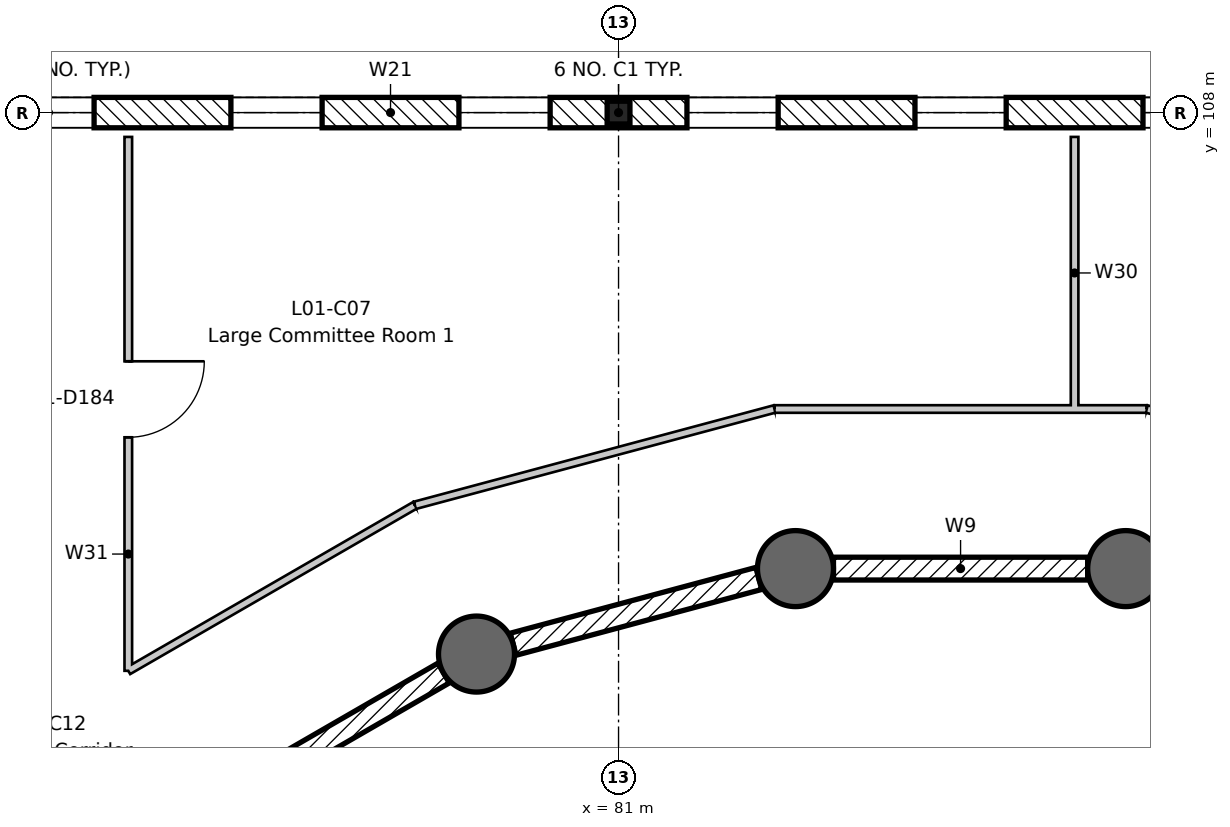
"""IFC4 building model, lengths in metres.
Left out: names, types, materials, properties, quantities, classifications, styles, units other than length and angle.
Written with IfcOpenShell. Run it as: python <this file> out.ifc"""

import sys

from ifc_helpers import new_model, si_unit, direction, frame, frame_2d, origin, origin_2d, place, context, subcontext, project, spatial, rectangle, circle, i_section, extrude, element, fill, save


model = new_model("IFC4")
c1 = context("Model", 3, precision=1e-05, world=origin(), true_north=direction((0.0, 1.0)))
c2 = subcontext(c1, "Body", "Model", "MODEL_VIEW")
j1 = project(units=[si_unit("LENGTHUNIT", "METRE"), si_unit("PLANEANGLEUNIT", "RADIAN")], contexts=[c1])
p1 = place(None, origin())
s1 = spatial("IfcSite", under=j1, at=p1, CompositionType="ELEMENT")
p2 = place(p1, origin())
s2 = spatial("IfcBuilding", under=s1, at=p2, CompositionType="ELEMENT")
p3 = place(p2, frame((0.0, 0.0, 5.4)))
s3 = spatial("IfcBuildingStorey", under=s2, at=p3, CompositionType="ELEMENT", Elevation=5.4)
for number, where, z_axis, x_axis in (
    (1, (87.672, 102.0, -0.2), (0.0, 0.0, 1.0), (1.0, 0.0, 0.0)),
    (2, (83.328, 102.0, -0.2), (0.0, 0.0, 1.0), (1.0, 0.0, 0.0)),
    (3, (79.131, 100.875, -0.2), (0.0, 0.0, 1.0), (1.0, 0.0, 0.0)),
):
    element("IfcColumn", number, at=place(p3, frame(where, z_axis=z_axis, x_axis=x_axis)), inside=s3, PredefinedType="COLUMN", context=c2, shape_type="SweptSolid", body=[
        extrude(circle(Radius=0.5, at=origin_2d()), origin(), (0.0, 0.0, 1.0), 2.7),
    ])
p4 = place(p3, frame((81.0, 108.0, -0.2), z_axis=(0.0, 0.0, 1.0), x_axis=(1.0, 0.0, 0.0)))
e4 = element("IfcColumn", 4, at=p4, inside=s3, PredefinedType="COLUMN", context=c2, shape_type="SweptSolid", body=[
    extrude(i_section(OverallWidth=0.3, OverallDepth=0.3, WebThickness=0.011, FlangeThickness=0.019, FilletRadius=0.027, at=origin_2d()), origin(), (0.0, 0.0, 1.0), 4.5),
])
p5 = place(p3, frame((87.172, 102.0, 0.0), z_axis=(0.0, 0.0, 1.0), x_axis=(-1.0, 0.0, 0.0)))
e5 = element("IfcWall", 5, at=p5, inside=s3, PredefinedType="PARTITIONING", context=c2, shape_type="SweptSolid", body=[
    extrude(rectangle(XDim=3.345, YDim=0.3, at=frame_2d((1.672, 0.0))), origin(), (0.0, 0.0, 1.0), 2.5),
])
for number, where, z_axis, x_axis in (
    (6, (82.845, 101.871, 0.0), (0.0, 0.0, 1.0), (-0.966, -0.259, 0.0)),
    (7, (78.698, 100.625, 0.0), (0.0, 0.0, 1.0), (-0.866, -0.5, 0.0)),
):
    element("IfcWall", number, at=place(p3, frame(where, z_axis=z_axis, x_axis=x_axis)), inside=s3, PredefinedType="PARTITIONING", context=c2, shape_type="SweptSolid", body=[
        extrude(rectangle(XDim=3.344, YDim=0.3, at=frame_2d((1.672, 0.0))), origin(), (0.0, 0.0, 1.0), 2.5),
    ])
p6 = place(p3, frame((72.0, 108.0, 0.0), z_axis=(0.0, 0.0, 1.0), x_axis=(1.0, 0.0, 0.0)))
e8 = element("IfcWall", 8, at=p6, inside=s3, PredefinedType="STANDARD", context=c2, shape_type="SweptSolid", body=[
    extrude(rectangle(XDim=27.0, YDim=0.4, at=frame_2d((13.5, 0.0))), origin(), (0.0, 0.0, 1.0), 3.81),
])
p7 = place(p6, frame((0.9, 0.0, 0.9)))
e9 = element("IfcOpeningElement", 9, at=p7, cuts=e8, PredefinedType="OPENING", context=c2, shape_type="SweptSolid", body=[
    extrude(rectangle(XDim=1.2, YDim=2.4, at=frame_2d((0.6, 1.2))), frame((0.0, 0.21, 0.0), z_axis=(0.0, -1.0, 0.0), x_axis=(1.0, 0.0, 0.0)), (0.0, 0.0, 1.0), 0.42),
])
p8 = place(p6, frame((3.9, 0.0, 0.9)))
e10 = element("IfcOpeningElement", 10, at=p8, cuts=e8, PredefinedType="OPENING", context=c2, shape_type="SweptSolid", body=[
    extrude(rectangle(XDim=1.2, YDim=2.4, at=frame_2d((0.6, 1.2))), frame((0.0, 0.21, 0.0), z_axis=(0.0, -1.0, 0.0), x_axis=(1.0, 0.0, 0.0)), (0.0, 0.0, 1.0), 0.42),
])
p9 = place(p6, frame((6.9, 0.0, 0.9)))
e11 = element("IfcOpeningElement", 11, at=p9, cuts=e8, PredefinedType="OPENING", context=c2, shape_type="SweptSolid", body=[
    extrude(rectangle(XDim=1.2, YDim=2.4, at=frame_2d((0.6, 1.2))), frame((0.0, 0.21, 0.0), z_axis=(0.0, -1.0, 0.0), x_axis=(1.0, 0.0, 0.0)), (0.0, 0.0, 1.0), 0.42),
])
p10 = place(p6, frame((9.9, 0.0, 0.9)))
e12 = element("IfcOpeningElement", 12, at=p10, cuts=e8, PredefinedType="OPENING", context=c2, shape_type="SweptSolid", body=[
    extrude(rectangle(XDim=1.2, YDim=2.4, at=frame_2d((0.6, 1.2))), frame((0.0, 0.21, 0.0), z_axis=(0.0, -1.0, 0.0), x_axis=(1.0, 0.0, 0.0)), (0.0, 0.0, 1.0), 0.42),
])
p11 = place(p6, frame((12.9, 0.0, 0.9)))
e13 = element("IfcOpeningElement", 13, at=p11, cuts=e8, PredefinedType="OPENING", context=c2, shape_type="SweptSolid", body=[
    extrude(rectangle(XDim=1.2, YDim=2.4, at=frame_2d((0.6, 1.2))), frame((0.0, 0.21, 0.0), z_axis=(0.0, -1.0, 0.0), x_axis=(1.0, 0.0, 0.0)), (0.0, 0.0, 1.0), 0.42),
])
p12 = place(p6, frame((15.9, 0.0, 0.9)))
e14 = element("IfcOpeningElement", 14, at=p12, cuts=e8, PredefinedType="OPENING", context=c2, shape_type="SweptSolid", body=[
    extrude(rectangle(XDim=1.2, YDim=2.4, at=frame_2d((0.6, 1.2))), frame((0.0, 0.21, 0.0), z_axis=(0.0, -1.0, 0.0), x_axis=(1.0, 0.0, 0.0)), (0.0, 0.0, 1.0), 0.42),
])
p13 = place(p6, frame((18.9, 0.0, 0.9)))
e15 = element("IfcOpeningElement", 15, at=p13, cuts=e8, PredefinedType="OPENING", context=c2, shape_type="SweptSolid", body=[
    extrude(rectangle(XDim=1.2, YDim=2.4, at=frame_2d((0.6, 1.2))), frame((0.0, 0.21, 0.0), z_axis=(0.0, -1.0, 0.0), x_axis=(1.0, 0.0, 0.0)), (0.0, 0.0, 1.0), 0.42),
])
p14 = place(p6, frame((21.9, 0.0, 0.9)))
e16 = element("IfcOpeningElement", 16, at=p14, cuts=e8, PredefinedType="OPENING", context=c2, shape_type="SweptSolid", body=[
    extrude(rectangle(XDim=1.2, YDim=2.4, at=frame_2d((0.6, 1.2))), frame((0.0, 0.21, 0.0), z_axis=(0.0, -1.0, 0.0), x_axis=(1.0, 0.0, 0.0)), (0.0, 0.0, 1.0), 0.42),
])
p15 = place(p6, frame((24.9, 0.0, 0.9)))
e17 = element("IfcOpeningElement", 17, at=p15, cuts=e8, PredefinedType="OPENING", context=c2, shape_type="SweptSolid", body=[
    extrude(rectangle(XDim=1.2, YDim=2.4, at=frame_2d((0.6, 1.2))), frame((0.0, 0.21, 0.0), z_axis=(0.0, -1.0, 0.0), x_axis=(1.0, 0.0, 0.0)), (0.0, 0.0, 1.0), 0.42),
])
p16 = place(p3, frame((87.0, 104.1, 0.0), z_axis=(0.0, 0.0, 1.0), x_axis=(0.0, 1.0, 0.0)))
e18 = element("IfcWall", 18, at=p16, inside=s3, PredefinedType="PARTITIONING", context=c2, shape_type="SweptSolid", body=[
    extrude(rectangle(XDim=3.58, YDim=0.1, at=frame_2d((1.79, 0.0))), origin(), (0.0, 0.0, 1.0), 3.81),
])
p17 = place(p3, frame((74.55, 107.68, 0.0), z_axis=(0.0, 0.0, 1.0), x_axis=(0.0, -1.0, 0.0)))
e19 = element("IfcWall", 19, at=p17, inside=s3, PredefinedType="PARTITIONING", context=c2, shape_type="SweptSolid", body=[
    extrude(rectangle(XDim=7.024, YDim=0.1, at=frame_2d((3.512, 0.0))), origin(), (0.0, 0.0, 1.0), 3.81),
])
p18 = place(p17, frame((2.952, 0.0, 0.0)))
e20 = element("IfcOpeningElement", 20, at=p18, cuts=e19, PredefinedType="OPENING", context=c2, shape_type="SweptSolid", body=[
    extrude(rectangle(XDim=1.0, YDim=2.1, at=frame_2d((0.5, 1.05))), frame((0.0, 0.06, 0.0), z_axis=(0.0, -1.0, 0.0), x_axis=(1.0, 0.0, 0.0)), (0.0, 0.0, 1.0), 0.12),
])
p19 = place(p3, frame((74.55, 100.656, 0.0), z_axis=(0.0, 0.0, 1.0), x_axis=(0.866029650479, 0.499992644437, 0.0)))
e21 = element("IfcWall", 21, at=p19, inside=s3, PredefinedType="PARTITIONING", context=c2, shape_type="SweptSolid", body=[
    extrude(rectangle(XDim=4.354, YDim=0.1, at=frame_2d((2.177, 0.0))), origin(), (0.0, 0.0, 1.0), 3.81),
])
p20 = place(p3, frame((78.321, 102.833, 0.0), z_axis=(0.0, 0.0, 1.0), x_axis=(0.965923128678, 0.258829112515, 0.0)))
e22 = element("IfcWall", 22, at=p20, inside=s3, PredefinedType="PARTITIONING", context=c2, shape_type="SweptSolid", body=[
    extrude(rectangle(XDim=4.897, YDim=0.1, at=frame_2d((2.449, 0.0))), origin(), (0.0, 0.0, 1.0), 3.81),
])
p21 = place(p3, frame((83.051, 104.1, 0.0), z_axis=(0.0, 0.0, 1.0), x_axis=(1.0, 0.0, 0.0)))
e23 = element("IfcWall", 23, at=p21, inside=s3, PredefinedType="PARTITIONING", context=c2, shape_type="SweptSolid", body=[
    extrude(rectangle(XDim=3.969, YDim=0.1, at=frame_2d((1.984, 0.0))), origin(), (0.0, 0.0, 1.0), 3.81),
])
p22 = place(p3, frame((86.98, 104.1, 0.0), z_axis=(0.0, 0.0, 1.0), x_axis=(1.0, 0.0, 0.0)))
e24 = element("IfcWall", 24, at=p22, inside=s3, PredefinedType="PARTITIONING", context=c2, shape_type="SweptSolid", body=[
    extrude(rectangle(XDim=0.969, YDim=0.1, at=frame_2d((0.484, 0.0))), origin(), (0.0, 0.0, 1.0), 3.81),
])
p23 = place(p3, frame((87.949, 104.1, 0.0), z_axis=(0.0, 0.0, 1.0), x_axis=(0.965923128678, -0.258829112515, 0.0)))
e25 = element("IfcWall", 25, at=p23, inside=s3, PredefinedType="PARTITIONING", context=c2, shape_type="SweptSolid", body=[
    extrude(rectangle(XDim=4.897, YDim=0.1, at=frame_2d((2.449, 0.0))), origin(), (0.0, 0.0, 1.0), 3.81),
])
p24 = place(p7, origin())
e26 = element("IfcWindow", 26, at=p24, inside=s3, PartitioningType="SINGLE_PANEL", PredefinedType="WINDOW", context=c2, shape_type="SweptSolid", body=[
    extrude(rectangle(XDim=1.2, YDim=2.4, at=frame_2d((0.6, 1.2))), frame((0.0, 0.03, 0.0), z_axis=(0.0, -1.0, 0.0), x_axis=(1.0, 0.0, 0.0)), (0.0, 0.0, 1.0), 0.06),
])
fill(e9, e26)
p25 = place(p8, origin())
e27 = element("IfcWindow", 27, at=p25, inside=s3, PartitioningType="SINGLE_PANEL", PredefinedType="WINDOW", context=c2, shape_type="SweptSolid", body=[
    extrude(rectangle(XDim=1.2, YDim=2.4, at=frame_2d((0.6, 1.2))), frame((0.0, 0.03, 0.0), z_axis=(0.0, -1.0, 0.0), x_axis=(1.0, 0.0, 0.0)), (0.0, 0.0, 1.0), 0.06),
])
fill(e10, e27)
p26 = place(p9, origin())
e28 = element("IfcWindow", 28, at=p26, inside=s3, PartitioningType="SINGLE_PANEL", PredefinedType="WINDOW", context=c2, shape_type="SweptSolid", body=[
    extrude(rectangle(XDim=1.2, YDim=2.4, at=frame_2d((0.6, 1.2))), frame((0.0, 0.03, 0.0), z_axis=(0.0, -1.0, 0.0), x_axis=(1.0, 0.0, 0.0)), (0.0, 0.0, 1.0), 0.06),
])
fill(e11, e28)
p27 = place(p10, origin())
e29 = element("IfcWindow", 29, at=p27, inside=s3, PartitioningType="SINGLE_PANEL", PredefinedType="WINDOW", context=c2, shape_type="SweptSolid", body=[
    extrude(rectangle(XDim=1.2, YDim=2.4, at=frame_2d((0.6, 1.2))), frame((0.0, 0.03, 0.0), z_axis=(0.0, -1.0, 0.0), x_axis=(1.0, 0.0, 0.0)), (0.0, 0.0, 1.0), 0.06),
])
fill(e12, e29)
p28 = place(p11, origin())
e30 = element("IfcWindow", 30, at=p28, inside=s3, PartitioningType="SINGLE_PANEL", PredefinedType="WINDOW", context=c2, shape_type="SweptSolid", body=[
    extrude(rectangle(XDim=1.2, YDim=2.4, at=frame_2d((0.6, 1.2))), frame((0.0, 0.03, 0.0), z_axis=(0.0, -1.0, 0.0), x_axis=(1.0, 0.0, 0.0)), (0.0, 0.0, 1.0), 0.06),
])
fill(e13, e30)
p29 = place(p12, origin())
e31 = element("IfcWindow", 31, at=p29, inside=s3, PartitioningType="SINGLE_PANEL", PredefinedType="WINDOW", context=c2, shape_type="SweptSolid", body=[
    extrude(rectangle(XDim=1.2, YDim=2.4, at=frame_2d((0.6, 1.2))), frame((0.0, 0.03, 0.0), z_axis=(0.0, -1.0, 0.0), x_axis=(1.0, 0.0, 0.0)), (0.0, 0.0, 1.0), 0.06),
])
fill(e14, e31)
p30 = place(p18, origin())
e32 = element("IfcDoor", 32, at=p30, inside=s3, OperationType="SINGLE_SWING_LEFT", PredefinedType="DOOR", context=c2, shape_type="SweptSolid", body=[
    extrude(rectangle(XDim=1.0, YDim=2.1, at=frame_2d((0.5, 1.05))), frame((0.0, 0.025, 0.0), z_axis=(0.0, -1.0, 0.0), x_axis=(1.0, 0.0, 0.0)), (0.0, 0.0, 1.0), 0.05),
])
fill(e20, e32)
save(model, sys.argv[1])
